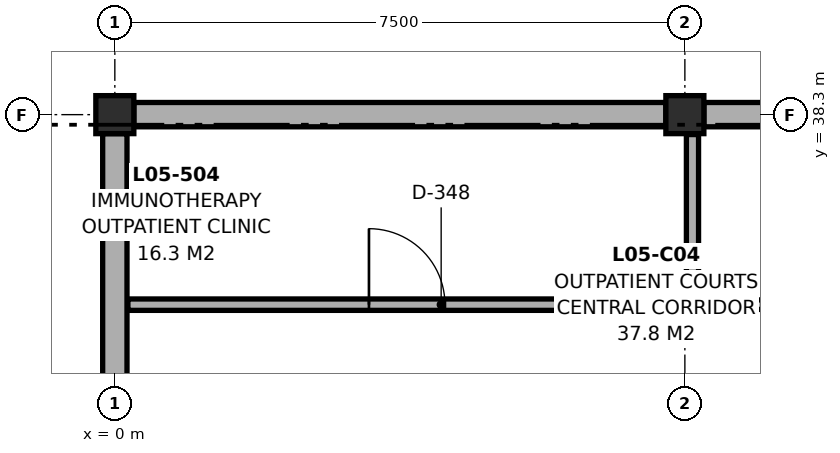
"""IFC4 building model, lengths in metres.
Left out: names, types, materials, properties, quantities, classifications, styles, units other than length and angle.
Written with IfcOpenShell. Run it as: python <this file> out.ifc"""

import sys

from ifc_helpers import new_model, si_unit, direction, frame, frame_2d, origin, origin_2d, place, context, subcontext, project, spatial, rectangle, extrude, element, fill, save


model = new_model("IFC4")
c1 = context("Model", 3, precision=1e-05, world=origin(), true_north=direction((0.0, 1.0)))
c2 = subcontext(c1, "Body", "Model", "MODEL_VIEW")
j1 = project(units=[si_unit("LENGTHUNIT", "METRE"), si_unit("PLANEANGLEUNIT", "RADIAN")], contexts=[c1])
p1 = place(None, origin())
s1 = spatial("IfcSite", under=j1, at=p1, CompositionType="ELEMENT")
p2 = place(p1, origin())
s2 = spatial("IfcBuilding", under=s1, at=p2, CompositionType="ELEMENT")
p3 = place(p2, frame((0.0, 0.0, 21.5)))
s3 = spatial("IfcBuildingStorey", under=s2, at=p3, CompositionType="ELEMENT", Elevation=21.5)
for number, where, z_axis, x_axis in (
    (1, (0.0, 38.3, 0.0), (0.0, 0.0, 1.0), (1.0, 0.0, 0.0)),
    (2, (7.5, 38.3, 0.0), (0.0, 0.0, 1.0), (1.0, 0.0, 0.0)),
):
    element("IfcColumn", number, at=place(p3, frame(where, z_axis=z_axis, x_axis=x_axis)), inside=s3, PredefinedType="COLUMN", context=c2, shape_type="SweptSolid", body=[
        extrude(rectangle(XDim=0.5, YDim=0.5, at=origin_2d()), origin(), (0.0, 0.0, 1.0), 3.8),
    ])
for number, where, z_axis, x_axis in (
    (3, (0.0, 31.05, 0.0), (0.0, 0.0, 1.0), (0.0, 1.0, 0.0)),
    (4, (0.25, 38.3, 0.0), (0.0, 0.0, 1.0), (1.0, 0.0, 0.0)),
    (5, (7.75, 38.3, 0.0), (0.0, 0.0, 1.0), (1.0, 0.0, 0.0)),
):
    element("IfcWall", number, at=place(p3, frame(where, z_axis=z_axis, x_axis=x_axis)), inside=s3, PredefinedType="SOLIDWALL", context=c2, shape_type="SweptSolid", body=[
        extrude(rectangle(XDim=7.0, YDim=0.32, at=frame_2d((3.5, 0.0))), origin(), (0.0, 0.0, 1.0), 3.7),
    ])
p4 = place(p3, frame((0.172, 35.8, 0.0), z_axis=(0.0, 0.0, 1.0), x_axis=(1.0, 0.0, 0.0)))
e6 = element("IfcWall", 6, at=p4, inside=s3, PredefinedType="PARTITIONING", context=c2, shape_type="SweptSolid", body=[
    extrude(rectangle(XDim=7.343, YDim=0.15, at=frame_2d((3.671, 0.0))), origin(), (0.0, 0.0, 1.0), 3.7),
])
p5 = place(p4, frame((3.171, 0.0, 0.0)))
e7 = element("IfcOpeningElement", 7, at=p5, cuts=e6, PredefinedType="OPENING", context=c2, shape_type="SweptSolid", body=[
    extrude(rectangle(XDim=1.0, YDim=2.15, at=frame_2d((0.5, 1.075))), frame((0.0, 0.087, 0.0), z_axis=(0.0, -1.0, 0.0), x_axis=(1.0, 0.0, 0.0)), (0.0, 0.0, 1.0), 0.174),
])
p6 = place(p3, frame((7.527, 35.8, 0.0), z_axis=(0.0, 0.0, 1.0), x_axis=(1.0, 0.0, 0.0)))
e8 = element("IfcWall", 8, at=p6, inside=s3, PredefinedType="PARTITIONING", context=c2, shape_type="SweptSolid", body=[
    extrude(rectangle(XDim=7.301, YDim=0.125, at=frame_2d((3.65, 0.0))), origin(), (0.0, 0.0, 1.0), 3.7),
])
p7 = place(p6, frame((3.125, 0.0, 0.0)))
e9 = element("IfcOpeningElement", 9, at=p7, cuts=e8, PredefinedType="OPENING", context=c2, shape_type="SweptSolid", body=[
    extrude(rectangle(XDim=1.05, YDim=2.15, at=frame_2d((0.525, 1.075))), frame((0.0, 0.074, 0.0), z_axis=(0.0, -1.0, 0.0), x_axis=(1.0, 0.0, 0.0)), (0.0, 0.0, 1.0), 0.149),
])
p8 = place(p3, frame((7.6, 35.875, 0.0), z_axis=(0.0, 0.0, 1.0), x_axis=(0.0, 1.0, 0.0)))
e10 = element("IfcWall", 10, at=p8, inside=s3, PredefinedType="PARTITIONING", context=c2, shape_type="SweptSolid", body=[
    extrude(rectangle(XDim=2.164, YDim=0.16, at=frame_2d((1.082, 0.0))), origin(), (0.0, 0.0, 1.0), 3.7),
])
p9 = place(p5, origin())
e11 = element("IfcDoor", 11, at=p9, inside=s3, OperationType="SINGLE_SWING_LEFT", PredefinedType="DOOR", context=c2, shape_type="SweptSolid", body=[
    extrude(rectangle(XDim=1.0, YDim=2.15, at=frame_2d((0.5, 1.075))), frame((0.0, 0.025, 0.0), z_axis=(0.0, -1.0, 0.0), x_axis=(1.0, 0.0, 0.0)), (0.0, 0.0, 1.0), 0.05),
])
fill(e7, e11)
save(model, sys.argv[1])
